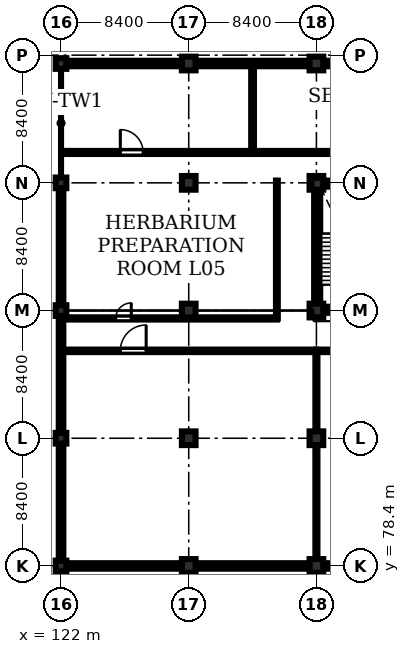
"""IFC4 building model, lengths in metres.
Left out: names, types, materials, properties, quantities, classifications, styles, units other than length and angle.
Written with IfcOpenShell. Run it as: python <this file> out.ifc"""

import sys

from ifc_helpers import new_model, si_unit, direction, frame, frame_2d, origin, origin_2d, place, context, subcontext, project, spatial, rectangle, extrude, element, fill, save


model = new_model("IFC4")
c1 = context("Model", 3, precision=1e-05, world=origin(), true_north=direction((0.0, 1.0)))
c2 = subcontext(c1, "Body", "Model", "MODEL_VIEW")
j1 = project(units=[si_unit("LENGTHUNIT", "METRE"), si_unit("PLANEANGLEUNIT", "RADIAN")], contexts=[c1])
p1 = place(None, origin())
s1 = spatial("IfcSite", under=j1, at=p1, CompositionType="ELEMENT")
p2 = place(p1, origin())
s2 = spatial("IfcBuilding", under=s1, at=p2, CompositionType="ELEMENT")
p3 = place(p2, frame((0.0, 0.0, 19.2)))
s3 = spatial("IfcBuildingStorey", under=s2, at=p3, CompositionType="ELEMENT", Elevation=19.2)
for number, where, z_axis, x_axis in (
    (1, (122.0, 78.4, 0.0), (0.0, 0.0, 1.0), (1.0, 0.0, 0.0)),
    (2, (122.0, 86.8, 0.0), (0.0, 0.0, 1.0), (1.0, 0.0, 0.0)),
    (3, (122.0, 95.2, 0.0), (0.0, 0.0, 1.0), (1.0, 0.0, 0.0)),
    (4, (122.0, 103.6, 0.0), (0.0, 0.0, 1.0), (1.0, 0.0, 0.0)),
    (5, (122.0, 111.45, 0.0), (0.0, 0.0, 1.0), (1.0, 0.0, 0.0)),
):
    element("IfcColumn", number, at=place(p3, frame(where, z_axis=z_axis, x_axis=x_axis)), inside=s3, PredefinedType="COLUMN", context=c2, shape_type="SweptSolid", body=[
        extrude(rectangle(XDim=0.7, YDim=0.7, at=origin_2d()), origin(), (0.0, 0.0, 1.0), 4.02),
    ])
for number, where, z_axis, x_axis in (
    (6, (130.4, 78.4, 0.0), (0.0, 0.0, 1.0), (1.0, 0.0, 0.0)),
    (7, (130.4, 86.8, 0.0), (0.0, 0.0, 1.0), (1.0, 0.0, 0.0)),
    (8, (130.4, 95.2, 0.0), (0.0, 0.0, 1.0), (1.0, 0.0, 0.0)),
    (9, (130.4, 103.6, 0.0), (0.0, 0.0, 1.0), (1.0, 0.0, 0.0)),
    (10, (130.4, 111.45, 0.0), (0.0, 0.0, 1.0), (1.0, 0.0, 0.0)),
    (11, (138.8, 78.4, 0.0), (0.0, 0.0, 1.0), (1.0, 0.0, 0.0)),
    (12, (138.8, 86.8, 0.0), (0.0, 0.0, 1.0), (1.0, 0.0, 0.0)),
    (13, (138.8, 95.2, 0.0), (0.0, 0.0, 1.0), (1.0, 0.0, 0.0)),
    (14, (138.8, 103.6, 0.0), (0.0, 0.0, 1.0), (1.0, 0.0, 0.0)),
    (15, (138.8, 111.45, 0.0), (0.0, 0.0, 1.0), (1.0, 0.0, 0.0)),
):
    element("IfcColumn", number, at=place(p3, frame(where, z_axis=z_axis, x_axis=x_axis)), inside=s3, PredefinedType="COLUMN", context=c2, shape_type="SweptSolid", body=[
        extrude(rectangle(XDim=0.9, YDim=0.9, at=origin_2d()), origin(), (0.0, 0.0, 1.0), 4.02),
    ])
for number, where, z_axis, x_axis in (
    (16, (138.65, 95.25, 0.0), (0.0, 0.0, 1.0), (1.0, 0.0, 0.0)),
    (17, (138.65, 103.55, 0.0), (0.0, 0.0, 1.0), (1.0, 0.0, 0.0)),
):
    element("IfcWall", number, at=place(p3, frame(where, z_axis=z_axis, x_axis=x_axis)), inside=s3, PredefinedType="SHEAR", context=c2, shape_type="SweptSolid", body=[
        extrude(rectangle(XDim=3.9, YDim=0.4, at=frame_2d((1.95, 0.0))), origin(), (0.0, 0.0, 1.0), 4.02),
    ])
p4 = place(p3, frame((138.85, 95.45, 0.0), z_axis=(0.0, 0.0, 1.0), x_axis=(0.0, 1.0, 0.0)))
e18 = element("IfcWall", 18, at=p4, inside=s3, PredefinedType="SHEAR", context=c2, shape_type="SweptSolid", body=[
    extrude(rectangle(XDim=7.9, YDim=0.4, at=frame_2d((3.95, 0.0))), origin(), (0.0, 0.0, 1.0), 4.02),
])
p5 = place(p3, frame((122.35, 111.45, 0.0), z_axis=(0.0, 0.0, 1.0), x_axis=(1.0, 0.0, 0.0)))
e19 = element("IfcWall", 19, at=p5, inside=s3, PredefinedType="STANDARD", context=c2, shape_type="SweptSolid", body=[
    extrude(rectangle(XDim=7.6, YDim=0.36, at=frame_2d((3.8, 0.0))), origin(), (0.0, 0.0, 1.0), 3.32),
])
p6 = place(p5, frame((1.3, 0.0, 1.1)))
e20 = element("IfcOpeningElement", 20, at=p6, cuts=e19, PredefinedType="OPENING", context=c2, shape_type="SweptSolid", body=[
    extrude(rectangle(XDim=1.2, YDim=1.5, at=frame_2d((0.6, 0.75))), frame((0.0, 0.19, 0.0), z_axis=(0.0, -1.0, 0.0), x_axis=(1.0, 0.0, 0.0)), (0.0, 0.0, 1.0), 0.38),
])
p7 = place(p5, frame((5.1, 0.0, 1.1)))
e21 = element("IfcOpeningElement", 21, at=p7, cuts=e19, PredefinedType="OPENING", context=c2, shape_type="SweptSolid", body=[
    extrude(rectangle(XDim=1.2, YDim=1.5, at=frame_2d((0.6, 0.75))), frame((0.0, 0.19, 0.0), z_axis=(0.0, -1.0, 0.0), x_axis=(1.0, 0.0, 0.0)), (0.0, 0.0, 1.0), 0.38),
])
p8 = place(p3, frame((130.85, 111.45, 0.0), z_axis=(0.0, 0.0, 1.0), x_axis=(1.0, 0.0, 0.0)))
e22 = element("IfcWall", 22, at=p8, inside=s3, PredefinedType="STANDARD", context=c2, shape_type="SweptSolid", body=[
    extrude(rectangle(XDim=7.5, YDim=0.36, at=frame_2d((3.75, 0.0))), origin(), (0.0, 0.0, 1.0), 3.32),
])
p9 = place(p8, frame((1.3, 0.0, 1.1)))
e23 = element("IfcOpeningElement", 23, at=p9, cuts=e22, PredefinedType="OPENING", context=c2, shape_type="SweptSolid", body=[
    extrude(rectangle(XDim=1.2, YDim=1.5, at=frame_2d((0.6, 0.75))), frame((0.0, 0.19, 0.0), z_axis=(0.0, -1.0, 0.0), x_axis=(1.0, 0.0, 0.0)), (0.0, 0.0, 1.0), 0.38),
])
p10 = place(p8, frame((5.1, 0.0, 1.1)))
e24 = element("IfcOpeningElement", 24, at=p10, cuts=e22, PredefinedType="OPENING", context=c2, shape_type="SweptSolid", body=[
    extrude(rectangle(XDim=1.2, YDim=1.5, at=frame_2d((0.6, 0.75))), frame((0.0, 0.19, 0.0), z_axis=(0.0, -1.0, 0.0), x_axis=(1.0, 0.0, 0.0)), (0.0, 0.0, 1.0), 0.38),
])
p11 = place(p3, frame((139.25, 111.45, 0.0), z_axis=(0.0, 0.0, 1.0), x_axis=(1.0, 0.0, 0.0)))
e25 = element("IfcWall", 25, at=p11, inside=s3, PredefinedType="STANDARD", context=c2, shape_type="SweptSolid", body=[
    extrude(rectangle(XDim=7.5, YDim=0.36, at=frame_2d((3.75, 0.0))), origin(), (0.0, 0.0, 1.0), 3.32),
])
p12 = place(p11, frame((1.3, 0.0, 1.1)))
e26 = element("IfcOpeningElement", 26, at=p12, cuts=e25, PredefinedType="OPENING", context=c2, shape_type="SweptSolid", body=[
    extrude(rectangle(XDim=1.2, YDim=1.5, at=frame_2d((0.6, 0.75))), frame((0.0, 0.19, 0.0), z_axis=(0.0, -1.0, 0.0), x_axis=(1.0, 0.0, 0.0)), (0.0, 0.0, 1.0), 0.38),
])
p13 = place(p11, frame((5.1, 0.0, 1.1)))
e27 = element("IfcOpeningElement", 27, at=p13, cuts=e25, PredefinedType="OPENING", context=c2, shape_type="SweptSolid", body=[
    extrude(rectangle(XDim=1.2, YDim=1.5, at=frame_2d((0.6, 0.75))), frame((0.0, 0.19, 0.0), z_axis=(0.0, -1.0, 0.0), x_axis=(1.0, 0.0, 0.0)), (0.0, 0.0, 1.0), 0.38),
])
p14 = place(p3, frame((129.95, 78.4, 0.0), z_axis=(0.0, 0.0, 1.0), x_axis=(-1.0, 0.0, 0.0)))
e28 = element("IfcWall", 28, at=p14, inside=s3, PredefinedType="STANDARD", context=c2, shape_type="SweptSolid", body=[
    extrude(rectangle(XDim=7.6, YDim=0.36, at=frame_2d((3.8, 0.0))), origin(), (0.0, 0.0, 1.0), 3.32),
])
p15 = place(p14, frame((1.15, 0.0, 0.95)))
e29 = element("IfcOpeningElement", 29, at=p15, cuts=e28, PredefinedType="OPENING", context=c2, shape_type="SweptSolid", body=[
    extrude(rectangle(XDim=1.5, YDim=1.5, at=frame_2d((0.75, 0.75))), frame((0.0, 0.19, 0.0), z_axis=(0.0, -1.0, 0.0), x_axis=(1.0, 0.0, 0.0)), (0.0, 0.0, 1.0), 0.38),
])
p16 = place(p3, frame((138.35, 78.4, 0.0), z_axis=(0.0, 0.0, 1.0), x_axis=(-1.0, 0.0, 0.0)))
e30 = element("IfcWall", 30, at=p16, inside=s3, PredefinedType="STANDARD", context=c2, shape_type="SweptSolid", body=[
    extrude(rectangle(XDim=7.5, YDim=0.36, at=frame_2d((3.75, 0.0))), origin(), (0.0, 0.0, 1.0), 3.32),
])
p17 = place(p16, frame((1.15, 0.0, 0.95)))
e31 = element("IfcOpeningElement", 31, at=p17, cuts=e30, PredefinedType="OPENING", context=c2, shape_type="SweptSolid", body=[
    extrude(rectangle(XDim=1.5, YDim=1.5, at=frame_2d((0.75, 0.75))), frame((0.0, 0.19, 0.0), z_axis=(0.0, -1.0, 0.0), x_axis=(1.0, 0.0, 0.0)), (0.0, 0.0, 1.0), 0.38),
])
p18 = place(p3, frame((146.75, 78.4, 0.0), z_axis=(0.0, 0.0, 1.0), x_axis=(-1.0, 0.0, 0.0)))
e32 = element("IfcWall", 32, at=p18, inside=s3, PredefinedType="STANDARD", context=c2, shape_type="SweptSolid", body=[
    extrude(rectangle(XDim=7.5, YDim=0.36, at=frame_2d((3.75, 0.0))), origin(), (0.0, 0.0, 1.0), 3.32),
])
p19 = place(p18, frame((1.15, 0.0, 0.95)))
e33 = element("IfcOpeningElement", 33, at=p19, cuts=e32, PredefinedType="OPENING", context=c2, shape_type="SweptSolid", body=[
    extrude(rectangle(XDim=1.5, YDim=1.5, at=frame_2d((0.75, 0.75))), frame((0.0, 0.19, 0.0), z_axis=(0.0, -1.0, 0.0), x_axis=(1.0, 0.0, 0.0)), (0.0, 0.0, 1.0), 0.38),
])
p20 = place(p3, frame((122.0, 78.75, 0.0), z_axis=(0.0, 0.0, 1.0), x_axis=(0.0, 1.0, 0.0)))
e34 = element("IfcWall", 34, at=p20, inside=s3, PredefinedType="STANDARD", context=c2, shape_type="SweptSolid", body=[
    extrude(rectangle(XDim=7.7, YDim=0.3, at=frame_2d((3.85, 0.0))), origin(), (0.0, 0.0, 1.0), 3.32),
])
p21 = place(p20, frame((2.4, 0.0, 0.95)))
e35 = element("IfcOpeningElement", 35, at=p21, cuts=e34, PredefinedType="OPENING", context=c2, shape_type="SweptSolid", body=[
    extrude(rectangle(XDim=1.5, YDim=1.8, at=frame_2d((0.75, 0.9))), frame((0.0, 0.16, 0.0), z_axis=(0.0, -1.0, 0.0), x_axis=(1.0, 0.0, 0.0)), (0.0, 0.0, 1.0), 0.32),
])
p22 = place(p3, frame((122.0, 87.15, 0.0), z_axis=(0.0, 0.0, 1.0), x_axis=(0.0, 1.0, 0.0)))
e36 = element("IfcWall", 36, at=p22, inside=s3, PredefinedType="STANDARD", context=c2, shape_type="SweptSolid", body=[
    extrude(rectangle(XDim=7.7, YDim=0.3, at=frame_2d((3.85, 0.0))), origin(), (0.0, 0.0, 1.0), 3.32),
])
p23 = place(p22, frame((2.4, 0.0, 0.95)))
e37 = element("IfcOpeningElement", 37, at=p23, cuts=e36, PredefinedType="OPENING", context=c2, shape_type="SweptSolid", body=[
    extrude(rectangle(XDim=1.5, YDim=1.8, at=frame_2d((0.75, 0.9))), frame((0.0, 0.16, 0.0), z_axis=(0.0, -1.0, 0.0), x_axis=(1.0, 0.0, 0.0)), (0.0, 0.0, 1.0), 0.32),
])
p24 = place(p3, frame((122.0, 95.55, 0.0), z_axis=(0.0, 0.0, 1.0), x_axis=(0.0, 1.0, 0.0)))
e38 = element("IfcWall", 38, at=p24, inside=s3, PredefinedType="STANDARD", context=c2, shape_type="SweptSolid", body=[
    extrude(rectangle(XDim=7.7, YDim=0.3, at=frame_2d((3.85, 0.0))), origin(), (0.0, 0.0, 1.0), 3.32),
])
p25 = place(p24, frame((2.4, 0.0, 1.0)))
e39 = element("IfcOpeningElement", 39, at=p25, cuts=e38, PredefinedType="OPENING", context=c2, shape_type="SweptSolid", body=[
    extrude(rectangle(XDim=1.8, YDim=1.8, at=frame_2d((0.9, 0.9))), frame((0.0, 0.16, 0.0), z_axis=(0.0, -1.0, 0.0), x_axis=(1.0, 0.0, 0.0)), (0.0, 0.0, 1.0), 0.32),
])
p26 = place(p3, frame((136.2, 94.68, 0.0), z_axis=(0.0, 0.0, 1.0), x_axis=(0.0, 1.0, 0.0)))
e40 = element("IfcWall", 40, at=p26, inside=s3, PredefinedType="PARTITIONING", context=c2, shape_type="SweptSolid", body=[
    extrude(rectangle(XDim=9.07, YDim=0.12, at=frame_2d((4.535, 0.0))), origin(), (0.0, 0.0, 1.0), 4.02),
])
p27 = place(p3, frame((122.4, 94.68, 0.0), z_axis=(0.0, 0.0, 1.0), x_axis=(1.0, 0.0, 0.0)))
e41 = element("IfcWall", 41, at=p27, inside=s3, PredefinedType="PARTITIONING", context=c2, shape_type="SweptSolid", body=[
    extrude(rectangle(XDim=13.8, YDim=0.145, at=frame_2d((6.9, 0.0))), origin(), (0.0, 0.0, 1.0), 4.02),
])
p28 = place(p27, frame((3.2, 0.0, 0.0)))
e42 = element("IfcOpeningElement", 42, at=p28, cuts=e41, PredefinedType="OPENING", context=c2, shape_type="SweptSolid", body=[
    extrude(rectangle(XDim=1.02, YDim=2.15, at=frame_2d((0.51, 1.075))), frame((0.0, 0.083, 0.0), z_axis=(0.0, -1.0, 0.0), x_axis=(1.0, 0.0, 0.0)), (0.0, 0.0, 1.0), 0.165),
])
p29 = place(p3, frame((122.15, 105.6, 0.0), z_axis=(0.0, 0.0, 1.0), x_axis=(1.0, 0.0, 0.0)))
e43 = element("IfcWall", 43, at=p29, inside=s3, PredefinedType="SOLIDWALL", context=c2, shape_type="SweptSolid", body=[
    extrude(rectangle(XDim=12.45, YDim=0.2, at=frame_2d((6.225, 0.0))), origin(), (0.0, 0.0, 1.0), 4.02),
])
p30 = place(p29, frame((3.75, 0.0, 0.0)))
e44 = element("IfcOpeningElement", 44, at=p30, cuts=e43, PredefinedType="OPENING", context=c2, shape_type="SweptSolid", body=[
    extrude(rectangle(XDim=1.5, YDim=2.2, at=frame_2d((0.75, 1.1))), frame((0.0, 0.11, 0.0), z_axis=(0.0, -1.0, 0.0), x_axis=(1.0, 0.0, 0.0)), (0.0, 0.0, 1.0), 0.22),
])
p31 = place(p3, frame((134.6, 105.6, 0.0), z_axis=(0.0, 0.0, 1.0), x_axis=(1.0, 0.0, 0.0)))
e45 = element("IfcWall", 45, at=p31, inside=s3, PredefinedType="SOLIDWALL", context=c2, shape_type="SweptSolid", body=[
    extrude(rectangle(XDim=16.8, YDim=0.2, at=frame_2d((8.4, 0.0))), origin(), (0.0, 0.0, 1.0), 4.02),
])
p32 = place(p31, frame((6.8, 0.0, 0.0)))
e46 = element("IfcOpeningElement", 46, at=p32, cuts=e45, PredefinedType="OPENING", context=c2, shape_type="SweptSolid", body=[
    extrude(rectangle(XDim=1.5, YDim=2.2, at=frame_2d((0.75, 1.1))), frame((0.0, 0.11, 0.0), z_axis=(0.0, -1.0, 0.0), x_axis=(1.0, 0.0, 0.0)), (0.0, 0.0, 1.0), 0.22),
])
p33 = place(p3, frame((134.6, 105.6, 0.0), z_axis=(0.0, 0.0, 1.0), x_axis=(0.0, 1.0, 0.0)))
e47 = element("IfcWall", 47, at=p33, inside=s3, PredefinedType="STANDARD", context=c2, shape_type="SweptSolid", body=[
    extrude(rectangle(XDim=5.75, YDim=0.18, at=frame_2d((2.875, 0.0))), origin(), (0.0, 0.0, 1.0), 3.52),
])
p34 = place(p3, frame((122.15, 92.55, 0.0), z_axis=(0.0, 0.0, 1.0), x_axis=(1.0, 0.0, 0.0)))
e48 = element("IfcWall", 48, at=p34, inside=s3, PredefinedType="PARTITIONING", context=c2, shape_type="SweptSolid", body=[
    extrude(rectangle(XDim=16.65, YDim=0.165, at=frame_2d((8.325, 0.0))), origin(), (0.0, 0.0, 1.0), 4.02),
])
p35 = place(p34, frame((3.75, 0.0, 0.0)))
e49 = element("IfcOpeningElement", 49, at=p35, cuts=e48, PredefinedType="OPENING", context=c2, shape_type="SweptSolid", body=[
    extrude(rectangle(XDim=1.7, YDim=2.2, at=frame_2d((0.85, 1.1))), frame((0.0, 0.093, 0.0), z_axis=(0.0, -1.0, 0.0), x_axis=(1.0, 0.0, 0.0)), (0.0, 0.0, 1.0), 0.185),
])
p36 = place(p3, frame((138.8, 92.55, 0.0), z_axis=(0.0, 0.0, 1.0), x_axis=(1.0, 0.0, 0.0)))
e50 = element("IfcWall", 50, at=p36, inside=s3, PredefinedType="PARTITIONING", context=c2, shape_type="SweptSolid", body=[
    extrude(rectangle(XDim=8.4, YDim=0.165, at=frame_2d((4.2, 0.0))), origin(), (0.0, 0.0, 1.0), 4.02),
])
p37 = place(p36, frame((3.4, 0.0, 0.0)))
e51 = element("IfcOpeningElement", 51, at=p37, cuts=e50, PredefinedType="OPENING", context=c2, shape_type="SweptSolid", body=[
    extrude(rectangle(XDim=1.02, YDim=2.15, at=frame_2d((0.51, 1.075))), frame((0.0, 0.093, 0.0), z_axis=(0.0, -1.0, 0.0), x_axis=(1.0, 0.0, 0.0)), (0.0, 0.0, 1.0), 0.185),
])
p38 = place(p3, frame((138.8, 78.55, 0.0), z_axis=(0.0, 0.0, 1.0), x_axis=(0.0, 1.0, 0.0)))
e52 = element("IfcWall", 52, at=p38, inside=s3, PredefinedType="PARTITIONING", context=c2, shape_type="SweptSolid", body=[
    extrude(rectangle(XDim=14.0, YDim=0.135, at=frame_2d((7.0, 0.0))), origin(), (0.0, 0.0, 1.0), 3.32),
])
p39 = place(p6, origin())
e53 = element("IfcWindow", 53, at=p39, inside=s3, PartitioningType="SINGLE_PANEL", PredefinedType="WINDOW", context=c2, shape_type="SweptSolid", body=[
    extrude(rectangle(XDim=1.2, YDim=1.5, at=frame_2d((0.6, 0.75))), frame((0.0, 0.03, 0.0), z_axis=(0.0, -1.0, 0.0), x_axis=(1.0, 0.0, 0.0)), (0.0, 0.0, 1.0), 0.06),
])
fill(e20, e53)
p40 = place(p7, origin())
e54 = element("IfcWindow", 54, at=p40, inside=s3, PartitioningType="SINGLE_PANEL", PredefinedType="WINDOW", context=c2, shape_type="SweptSolid", body=[
    extrude(rectangle(XDim=1.2, YDim=1.5, at=frame_2d((0.6, 0.75))), frame((0.0, 0.03, 0.0), z_axis=(0.0, -1.0, 0.0), x_axis=(1.0, 0.0, 0.0)), (0.0, 0.0, 1.0), 0.06),
])
fill(e21, e54)
p41 = place(p9, origin())
e55 = element("IfcWindow", 55, at=p41, inside=s3, PartitioningType="SINGLE_PANEL", PredefinedType="WINDOW", context=c2, shape_type="SweptSolid", body=[
    extrude(rectangle(XDim=1.2, YDim=1.5, at=frame_2d((0.6, 0.75))), frame((0.0, 0.03, 0.0), z_axis=(0.0, -1.0, 0.0), x_axis=(1.0, 0.0, 0.0)), (0.0, 0.0, 1.0), 0.06),
])
fill(e23, e55)
p42 = place(p10, origin())
e56 = element("IfcWindow", 56, at=p42, inside=s3, PartitioningType="SINGLE_PANEL", PredefinedType="WINDOW", context=c2, shape_type="SweptSolid", body=[
    extrude(rectangle(XDim=1.2, YDim=1.5, at=frame_2d((0.6, 0.75))), frame((0.0, 0.03, 0.0), z_axis=(0.0, -1.0, 0.0), x_axis=(1.0, 0.0, 0.0)), (0.0, 0.0, 1.0), 0.06),
])
fill(e24, e56)
p43 = place(p15, origin())
e57 = element("IfcWindow", 57, at=p43, inside=s3, PartitioningType="DOUBLE_PANEL_VERTICAL", PredefinedType="WINDOW", context=c2, shape_type="SweptSolid", body=[
    extrude(rectangle(XDim=1.5, YDim=1.5, at=frame_2d((0.75, 0.75))), frame((0.0, 0.03, 0.0), z_axis=(0.0, -1.0, 0.0), x_axis=(1.0, 0.0, 0.0)), (0.0, 0.0, 1.0), 0.06),
])
fill(e29, e57)
p44 = place(p17, origin())
e58 = element("IfcWindow", 58, at=p44, inside=s3, PartitioningType="DOUBLE_PANEL_VERTICAL", PredefinedType="WINDOW", context=c2, shape_type="SweptSolid", body=[
    extrude(rectangle(XDim=1.5, YDim=1.5, at=frame_2d((0.75, 0.75))), frame((0.0, 0.03, 0.0), z_axis=(0.0, -1.0, 0.0), x_axis=(1.0, 0.0, 0.0)), (0.0, 0.0, 1.0), 0.06),
])
fill(e31, e58)
p45 = place(p21, origin())
e59 = element("IfcWindow", 59, at=p45, inside=s3, PartitioningType="DOUBLE_PANEL_VERTICAL", PredefinedType="WINDOW", context=c2, shape_type="SweptSolid", body=[
    extrude(rectangle(XDim=1.5, YDim=1.8, at=frame_2d((0.75, 0.9))), frame((0.0, 0.03, 0.0), z_axis=(0.0, -1.0, 0.0), x_axis=(1.0, 0.0, 0.0)), (0.0, 0.0, 1.0), 0.06),
])
fill(e35, e59)
p46 = place(p23, origin())
e60 = element("IfcWindow", 60, at=p46, inside=s3, PartitioningType="DOUBLE_PANEL_VERTICAL", PredefinedType="WINDOW", context=c2, shape_type="SweptSolid", body=[
    extrude(rectangle(XDim=1.5, YDim=1.8, at=frame_2d((0.75, 0.9))), frame((0.0, 0.03, 0.0), z_axis=(0.0, -1.0, 0.0), x_axis=(1.0, 0.0, 0.0)), (0.0, 0.0, 1.0), 0.06),
])
fill(e37, e60)
p47 = place(p25, origin())
e61 = element("IfcWindow", 61, at=p47, inside=s3, PartitioningType="DOUBLE_PANEL_VERTICAL", PredefinedType="WINDOW", context=c2, shape_type="SweptSolid", body=[
    extrude(rectangle(XDim=1.8, YDim=1.8, at=frame_2d((0.9, 0.9))), frame((0.0, 0.03, 0.0), z_axis=(0.0, -1.0, 0.0), x_axis=(1.0, 0.0, 0.0)), (0.0, 0.0, 1.0), 0.06),
])
fill(e39, e61)
p48 = place(p28, origin())
e62 = element("IfcDoor", 62, at=p48, inside=s3, OperationType="SINGLE_SWING_RIGHT", PredefinedType="DOOR", context=c2, shape_type="SweptSolid", body=[
    extrude(rectangle(XDim=1.02, YDim=2.15, at=frame_2d((0.51, 1.075))), frame((0.0, 0.025, 0.0), z_axis=(0.0, -1.0, 0.0), x_axis=(1.0, 0.0, 0.0)), (0.0, 0.0, 1.0), 0.05),
])
fill(e42, e62)
p49 = place(p30, origin())
e63 = element("IfcDoor", 63, at=p49, inside=s3, OperationType="SINGLE_SWING_LEFT", PredefinedType="DOOR", context=c2, shape_type="SweptSolid", body=[
    extrude(rectangle(XDim=1.5, YDim=2.2, at=frame_2d((0.75, 1.1))), frame((0.0, 0.025, 0.0), z_axis=(0.0, -1.0, 0.0), x_axis=(1.0, 0.0, 0.0)), (0.0, 0.0, 1.0), 0.05),
])
fill(e44, e63)
p50 = place(p35, origin())
e64 = element("IfcDoor", 64, at=p50, inside=s3, OperationType="SINGLE_SWING_RIGHT", PredefinedType="DOOR", context=c2, shape_type="SweptSolid", body=[
    extrude(rectangle(XDim=1.7, YDim=2.2, at=frame_2d((0.85, 1.1))), frame((0.0, 0.025, 0.0), z_axis=(0.0, -1.0, 0.0), x_axis=(1.0, 0.0, 0.0)), (0.0, 0.0, 1.0), 0.05),
])
fill(e49, e64)
save(model, sys.argv[1])
